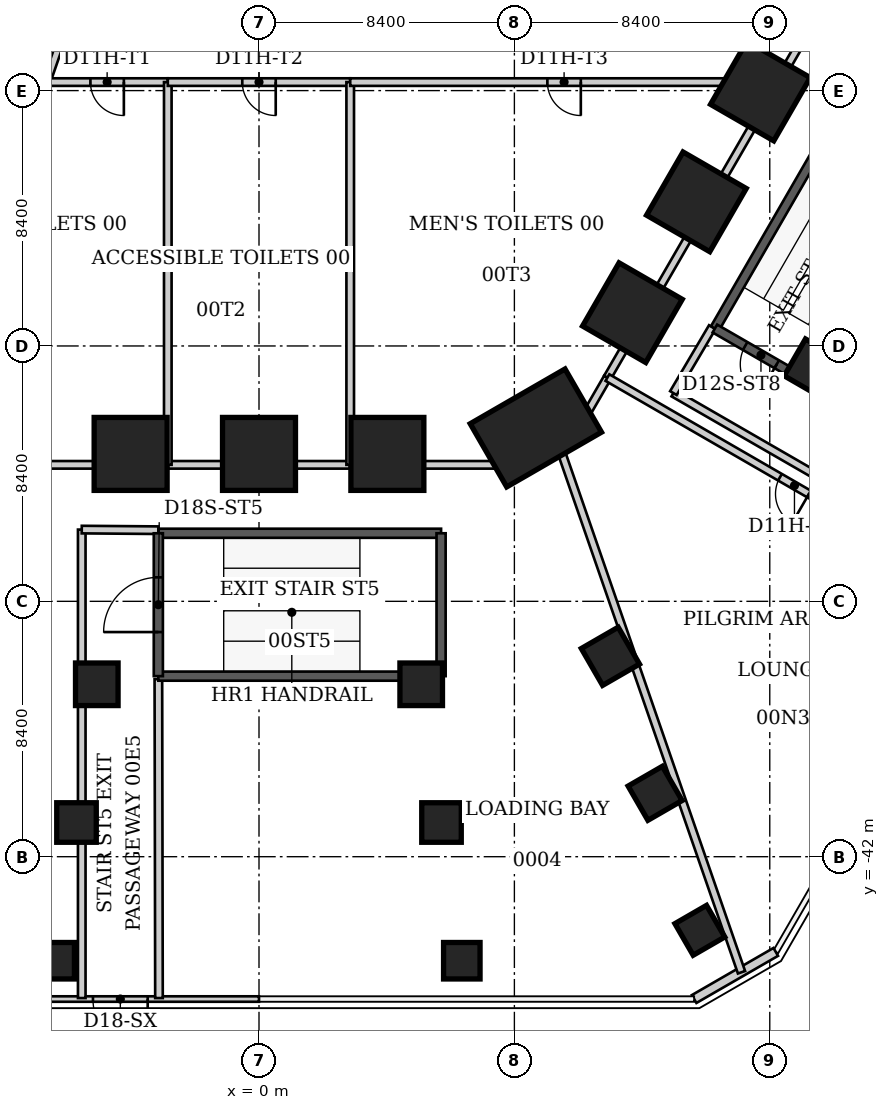
"""IFC4 building model, lengths in metres.
Left out: names, types, materials, properties, quantities, classifications, styles, units other than length and angle.
Written with IfcOpenShell. Run it as: python <this file> out.ifc"""

import sys

from ifc_helpers import new_model, si_unit, direction, frame, frame_2d, origin, origin_2d, place, context, subcontext, project, spatial, rectangle, extrude, element, fill, save


model = new_model("IFC4")
c1 = context("Model", 3, precision=1e-05, world=origin(), true_north=direction((0.0, 1.0)))
c2 = subcontext(c1, "Body", "Model", "MODEL_VIEW")
j1 = project(units=[si_unit("LENGTHUNIT", "METRE"), si_unit("PLANEANGLEUNIT", "RADIAN")], contexts=[c1])
p1 = place(None, origin())
s1 = spatial("IfcSite", under=j1, at=p1, CompositionType="ELEMENT")
p2 = place(p1, origin())
s2 = spatial("IfcBuilding", under=s1, at=p2, CompositionType="ELEMENT")
p3 = place(p2, origin())
s3 = spatial("IfcBuildingStorey", under=s2, at=p3, CompositionType="ELEMENT", Elevation=0.0)
for number, where, z_axis, x_axis in (
    (1, (16.491, -16.813, -0.2), (0.0, 0.0, 1.0), (0.866, -0.5, 0.0)),
    (2, (14.387, -20.459, -0.2), (0.0, 0.0, 1.0), (0.866, -0.5, 0.0)),
    (3, (12.282, -24.105, -0.2), (0.0, 0.0, 1.0), (0.866, -0.5, 0.0)),
):
    element("IfcColumn", number, at=place(p3, frame(where, z_axis=z_axis, x_axis=x_axis)), inside=s3, PredefinedType="COLUMN", context=c2, shape_type="SweptSolid", body=[
        extrude(rectangle(XDim=2.4, YDim=2.4, at=origin_2d()), origin(), (0.0, 0.0, 1.0), 6.2),
    ])
p4 = place(p3, frame((9.106, -27.897, -0.2), z_axis=(0.0, 0.0, 1.0), x_axis=(0.5, -0.866025403784, 0.0)))
e4 = element("IfcColumn", 4, at=p4, inside=s3, PredefinedType="COLUMN", context=c2, shape_type="SweptSolid", body=[
    extrude(rectangle(XDim=2.4, YDim=3.6, at=origin_2d()), origin(), (0.0, 0.0, 1.0), 6.2),
])
for number, where, z_axis, x_axis in (
    (5, (4.222, -28.751, -0.2), (0.0, 0.0, 1.0), (0.0, -1.0, 0.0)),
    (6, (0.0, -28.751, -0.2), (0.0, 0.0, 1.0), (0.0, -1.0, 0.0)),
    (7, (-4.222, -28.751, -0.2), (0.0, 0.0, 1.0), (0.0, -1.0, 0.0)),
):
    element("IfcColumn", number, at=place(p3, frame(where, z_axis=z_axis, x_axis=x_axis)), inside=s3, PredefinedType="COLUMN", context=c2, shape_type="SweptSolid", body=[
        extrude(rectangle(XDim=2.4, YDim=2.4, at=origin_2d()), origin(), (0.0, 0.0, 1.0), 6.2),
    ])
for number, where, z_axis, x_axis in (
    (8, (18.23, -25.926, -0.2), (0.0, 0.0, 1.0), (0.866, -0.5, 0.0)),
    (9, (11.558, -35.408, -0.2), (0.0, 0.0, 1.0), (0.5, -0.866, 0.0)),
    (10, (5.335, -36.329, -0.2), (0.0, 0.0, 1.0), (0.0, -1.0, 0.0)),
    (11, (-5.335, -36.329, -0.2), (0.0, 0.0, 1.0), (0.0, -1.0, 0.0)),
):
    element("IfcColumn", number, at=place(p3, frame(where, z_axis=z_axis, x_axis=x_axis)), inside=s3, PredefinedType="COLUMN", context=c2, shape_type="SweptSolid", body=[
        extrude(rectangle(XDim=1.4, YDim=1.4, at=origin_2d()), origin(), (0.0, 0.0, 1.0), 6.2),
    ])
for number, where, z_axis, x_axis in (
    (12, (13.029, -39.915, -0.2), (0.0, 0.0, 1.0), (0.5, -0.866, 0.0)),
    (13, (6.003, -40.875, -0.2), (0.0, 0.0, 1.0), (0.0, -1.0, 0.0)),
    (14, (-6.003, -40.875, -0.2), (0.0, 0.0, 1.0), (0.0, -1.0, 0.0)),
):
    element("IfcColumn", number, at=place(p3, frame(where, z_axis=z_axis, x_axis=x_axis)), inside=s3, PredefinedType="COLUMN", context=c2, shape_type="SweptSolid", body=[
        extrude(rectangle(XDim=1.3, YDim=1.3, at=origin_2d()), origin(), (0.0, 0.0, 1.0), 6.2),
    ])
for number, where, z_axis, x_axis in (
    (15, (14.5, -44.421, -0.2), (0.0, 0.0, 1.0), (0.5, -0.866, 0.0)),
    (16, (6.671, -45.422, -0.2), (0.0, 0.0, 1.0), (0.0, -1.0, 0.0)),
    (17, (-6.671, -45.422, -0.2), (0.0, 0.0, 1.0), (0.0, -1.0, 0.0)),
):
    element("IfcColumn", number, at=place(p3, frame(where, z_axis=z_axis, x_axis=x_axis)), inside=s3, PredefinedType="COLUMN", context=c2, shape_type="SweptSolid", body=[
        extrude(rectangle(XDim=1.2, YDim=1.2, at=origin_2d()), origin(), (0.0, 0.0, 1.0), 6.2),
    ])
p5 = place(p3, frame((16.997, -45.132, 0.0), z_axis=(0.0, 0.0, 1.0), x_axis=(-0.86600983753, -0.500026960575, 0.0)))
e18 = element("IfcWall", 18, at=p5, inside=s3, PredefinedType="SOLIDWALL", context=c2, shape_type="SweptSolid", body=[
    extrude(rectangle(XDim=3.1, YDim=0.3, at=frame_2d((1.55, 0.0))), origin(), (0.0, 0.0, 1.0), 5.84),
])
p6 = place(p3, frame((0.0, -46.682, 0.0), z_axis=(0.0, 0.0, 1.0), x_axis=(-1.0, 0.0, 0.0)))
e19 = element("IfcWall", 19, at=p6, inside=s3, PredefinedType="SOLIDWALL", context=c2, shape_type="SweptSolid", body=[
    extrude(rectangle(XDim=7.156, YDim=0.18, at=frame_2d((3.578, 0.0))), origin(), (0.0, 0.0, 1.0), 5.84),
])
p7 = place(p6, frame((3.661, 0.0, 0.0)))
e20 = element("IfcOpeningElement", 20, at=p7, cuts=e19, PredefinedType="OPENING", context=c2, shape_type="SweptSolid", body=[
    extrude(rectangle(XDim=1.8, YDim=2.7, at=frame_2d((0.9, 1.35))), frame((0.0, 0.09, 0.0), z_axis=(0.0, -1.0, 0.0), x_axis=(1.0, 0.0, 0.0)), (0.0, 0.0, 1.0), 0.18),
])
p8 = place(p3, frame((-8.65, -29.11, 0.0), z_axis=(0.0, 0.0, 1.0), x_axis=(1.0, 0.0, 0.0)))
e21 = element("IfcWall", 21, at=p8, inside=s3, PredefinedType="PARTITIONING", context=c2, shape_type="SweptSolid", body=[
    extrude(rectangle(XDim=5.65, YDim=0.25, at=frame_2d((2.825, 0.0))), origin(), (0.0, 0.0, 1.0), 4.04),
])
p9 = place(p3, frame((-5.83, -31.24, 0.0), z_axis=(0.0, 0.0, 1.0), x_axis=(0.0, -1.0, 0.0)))
e22 = element("IfcWall", 22, at=p9, inside=s3, PredefinedType="PARTITIONING", context=c2, shape_type="SweptSolid", body=[
    extrude(rectangle(XDim=15.41, YDim=0.25, at=frame_2d((7.705, 0.0))), origin(), (0.0, 0.0, 1.0), 5.083),
])
p10 = place(p3, frame((-5.81, -13.12, 0.0), z_axis=(0.0, 0.0, 1.0), x_axis=(-0.327865380048, -0.944724453249, 0.0)))
e23 = element("IfcWall", 23, at=p10, inside=s3, PredefinedType="PARTITIONING", context=c2, shape_type="SweptSolid", body=[
    extrude(rectangle(XDim=3.599, YDim=0.25, at=frame_2d((1.799, 0.0))), origin(), (0.0, 0.0, 1.0), 5.84),
])
p11 = place(p3, frame((-3.31, -31.26, 0.0), z_axis=(0.0, 0.0, 1.0), x_axis=(-0.999968446362, 0.007943946193, 0.0)))
e24 = element("IfcWall", 24, at=p11, inside=s3, PredefinedType="PARTITIONING", context=c2, shape_type="SweptSolid", body=[
    extrude(rectangle(XDim=2.52, YDim=0.25, at=frame_2d((1.26, 0.0))), origin(), (0.0, 0.0, 1.0), 5.84),
])
p12 = place(p3, frame((-3.29, -46.65, 0.0), z_axis=(0.0, 0.0, 1.0), x_axis=(-0.001908437887, 0.999998178931, 0.0)))
e25 = element("IfcWall", 25, at=p12, inside=s3, PredefinedType="PARTITIONING", context=c2, shape_type="SweptSolid", body=[
    extrude(rectangle(XDim=10.49, YDim=0.25, at=frame_2d((5.245, 0.0))), origin(), (0.0, 0.0, 1.0), 5.75),
])
p13 = place(p3, frame((-3.0, -29.11, 0.0), z_axis=(0.0, 0.0, 1.0), x_axis=(1.0, 0.0, 0.0)))
e26 = element("IfcWall", 26, at=p13, inside=s3, PredefinedType="PARTITIONING", context=c2, shape_type="SweptSolid", body=[
    extrude(rectangle(XDim=6.0, YDim=0.25, at=frame_2d((3.0, 0.0))), origin(), (0.0, 0.0, 1.0), 4.04),
])
p14 = place(p3, frame((-3.0, -16.52, 0.0), z_axis=(0.0, 0.0, 1.0), x_axis=(-1.0, 0.0, 0.0)))
e27 = element("IfcWall", 27, at=p14, inside=s3, PredefinedType="PARTITIONING", context=c2, shape_type="SweptSolid", body=[
    extrude(rectangle(XDim=3.99, YDim=0.25, at=frame_2d((1.995, 0.0))), origin(), (0.0, 0.0, 1.0), 5.84),
])
p15 = place(p14, frame((1.445, 0.0, 0.0)))
e28 = element("IfcOpeningElement", 28, at=p15, cuts=e27, PredefinedType="OPENING", context=c2, shape_type="SweptSolid", body=[
    extrude(rectangle(XDim=1.1, YDim=2.2, at=frame_2d((0.55, 1.1))), frame((0.0, 0.125, 0.0), z_axis=(0.0, -1.0, 0.0), x_axis=(1.0, 0.0, 0.0)), (0.0, 0.0, 1.0), 0.25),
])
p16 = place(p3, frame((-3.0, -16.52, 0.0), z_axis=(0.0, 0.0, 1.0), x_axis=(0.0, -1.0, 0.0)))
e29 = element("IfcWall", 29, at=p16, inside=s3, PredefinedType="PARTITIONING", context=c2, shape_type="SweptSolid", body=[
    extrude(rectangle(XDim=12.59, YDim=0.25, at=frame_2d((6.295, 0.0))), origin(), (0.0, 0.0, 1.0), 5.84),
])
p17 = place(p3, frame((3.0, -29.11, 0.0), z_axis=(0.0, 0.0, 1.0), x_axis=(1.0, 0.0, 0.0)))
e30 = element("IfcWall", 30, at=p17, inside=s3, PredefinedType="PARTITIONING", context=c2, shape_type="SweptSolid", body=[
    extrude(rectangle(XDim=5.65, YDim=0.25, at=frame_2d((2.825, 0.0))), origin(), (0.0, 0.0, 1.0), 4.04),
])
p18 = place(p3, frame((3.0, -16.52, 0.0), z_axis=(0.0, 0.0, 1.0), x_axis=(-1.0, 0.0, 0.0)))
e31 = element("IfcWall", 31, at=p18, inside=s3, PredefinedType="PARTITIONING", context=c2, shape_type="SweptSolid", body=[
    extrude(rectangle(XDim=6.0, YDim=0.25, at=frame_2d((3.0, 0.0))), origin(), (0.0, 0.0, 1.0), 5.84),
])
p19 = place(p18, frame((2.45, 0.0, 0.0)))
e32 = element("IfcOpeningElement", 32, at=p19, cuts=e31, PredefinedType="OPENING", context=c2, shape_type="SweptSolid", body=[
    extrude(rectangle(XDim=1.1, YDim=2.2, at=frame_2d((0.55, 1.1))), frame((0.0, 0.125, 0.0), z_axis=(0.0, -1.0, 0.0), x_axis=(1.0, 0.0, 0.0)), (0.0, 0.0, 1.0), 0.25),
])
p20 = place(p3, frame((3.0, -16.52, 0.0), z_axis=(0.0, 0.0, 1.0), x_axis=(0.0, -1.0, 0.0)))
e33 = element("IfcWall", 33, at=p20, inside=s3, PredefinedType="PARTITIONING", context=c2, shape_type="SweptSolid", body=[
    extrude(rectangle(XDim=12.59, YDim=0.25, at=frame_2d((6.295, 0.0))), origin(), (0.0, 0.0, 1.0), 5.84),
])
p21 = place(p3, frame((8.65, -29.11, 0.0), z_axis=(0.0, 0.0, 1.0), x_axis=(0.865736025111, 0.500500883941, 0.0)))
e34 = element("IfcWall", 34, at=p21, inside=s3, PredefinedType="PARTITIONING", context=c2, shape_type="SweptSolid", body=[
    extrude(rectangle(XDim=1.384, YDim=0.25, at=frame_2d((0.692, 0.0))), origin(), (0.0, 0.0, 1.0), 5.84),
])
p22 = place(p3, frame((9.85, -28.42, 0.0), z_axis=(0.0, 0.0, 1.0), x_axis=(0.327267371913, -0.944931779168, 0.0)))
e35 = element("IfcWall", 35, at=p22, inside=s3, PredefinedType="PARTITIONING", context=c2, shape_type="SweptSolid", body=[
    extrude(rectangle(XDim=18.395, YDim=0.25, at=frame_2d((9.197, 0.0))), origin(), (0.0, 0.0, 1.0), 5.75),
])
p23 = place(p3, frame((10.38, -28.11, 0.0), z_axis=(0.0, 0.0, 1.0), x_axis=(-0.865714845822, -0.5005375168, 0.0)))
e36 = element("IfcWall", 36, at=p23, inside=s3, PredefinedType="PARTITIONING", context=c2, shape_type="SweptSolid", body=[
    extrude(rectangle(XDim=0.579, YDim=0.25, at=frame_2d((0.29, 0.0))), origin(), (0.0, 0.0, 1.0), 5.84),
])
p24 = place(p3, frame((10.38, -28.11, 0.0), z_axis=(0.0, 0.0, 1.0), x_axis=(0.500126914667, 0.865952117167, 0.0)))
e37 = element("IfcWall", 37, at=p24, inside=s3, PredefinedType="PARTITIONING", context=c2, shape_type="SweptSolid", body=[
    extrude(rectangle(XDim=2.16, YDim=0.25, at=frame_2d((1.08, 0.0))), origin(), (0.0, 0.0, 1.0), 5.84),
])
p25 = place(p3, frame((11.46, -26.24, 0.0), z_axis=(0.0, 0.0, 1.0), x_axis=(0.500553622729, 0.865705533523, 0.0)))
e38 = element("IfcWall", 38, at=p25, inside=s3, PredefinedType="PARTITIONING", context=c2, shape_type="SweptSolid", body=[
    extrude(rectangle(XDim=11.228, YDim=0.25, at=frame_2d((5.614, 0.0))), origin(), (0.0, 0.0, 1.0), 4.04),
])
p26 = place(p3, frame((13.63, -26.75, 0.0), z_axis=(0.0, 0.0, 1.0), x_axis=(0.866259937365, -0.49959355572, 0.0)))
e39 = element("IfcWall", 39, at=p26, inside=s3, PredefinedType="PARTITIONING", context=c2, shape_type="SweptSolid", body=[
    extrude(rectangle(XDim=12.08, YDim=0.25, at=frame_2d((6.04, 0.0))), origin(), (0.0, 0.0, 1.0), 5.75),
])
p27 = place(p3, frame((14.91, -24.58, 0.0), z_axis=(0.0, 0.0, 1.0), x_axis=(-0.508082727165, -0.861308273707, 0.0)))
e40 = element("IfcWall", 40, at=p27, inside=s3, PredefinedType="PARTITIONING", context=c2, shape_type="SweptSolid", body=[
    extrude(rectangle(XDim=2.519, YDim=0.25, at=frame_2d((1.26, 0.0))), origin(), (0.0, 0.0, 1.0), 5.84),
])
p28 = place(p3, frame((17.07, -16.52, 0.0), z_axis=(0.0, 0.0, 1.0), x_axis=(-1.0, 0.0, 0.0)))
e41 = element("IfcWall", 41, at=p28, inside=s3, PredefinedType="PARTITIONING", context=c2, shape_type="SweptSolid", body=[
    extrude(rectangle(XDim=14.07, YDim=0.25, at=frame_2d((7.035, 0.0))), origin(), (0.0, 0.0, 1.0), 5.84),
])
p29 = place(p28, frame((6.485, 0.0, 0.0)))
e42 = element("IfcOpeningElement", 42, at=p29, cuts=e41, PredefinedType="OPENING", context=c2, shape_type="SweptSolid", body=[
    extrude(rectangle(XDim=1.1, YDim=2.2, at=frame_2d((0.55, 1.1))), frame((0.0, 0.125, 0.0), z_axis=(0.0, -1.0, 0.0), x_axis=(1.0, 0.0, 0.0)), (0.0, 0.0, 1.0), 0.25),
])
p30 = place(p3, frame((17.07, -16.52, 0.0), z_axis=(0.0, 0.0, 1.0), x_axis=(0.500243727505, 0.865884641908, 0.0)))
e43 = element("IfcWall", 43, at=p30, inside=s3, PredefinedType="PARTITIONING", context=c2, shape_type="SweptSolid", body=[
    extrude(rectangle(XDim=15.972, YDim=0.25, at=frame_2d((7.986, 0.0))), origin(), (0.0, 0.0, 1.0), 4.04),
])
p31 = place(p3, frame((23.764, -33.345, 0.0), z_axis=(0.0, 0.0, 1.0), x_axis=(-0.865986126124, 0.500068024733, 0.0)))
e44 = element("IfcWall", 44, at=p31, inside=s3, PredefinedType="PARTITIONING", context=c2, shape_type="SweptSolid", body=[
    extrude(rectangle(XDim=14.208, YDim=0.25, at=frame_2d((7.104, 0.0))), origin(), (0.0, 0.0, 1.0), 5.75),
])
p32 = place(p31, frame((6.554, 0.0, 0.0)))
e45 = element("IfcOpeningElement", 45, at=p32, cuts=e44, PredefinedType="OPENING", context=c2, shape_type="SweptSolid", body=[
    extrude(rectangle(XDim=1.1, YDim=2.2, at=frame_2d((0.55, 1.1))), frame((0.0, 0.125, 0.0), z_axis=(0.0, -1.0, 0.0), x_axis=(1.0, 0.0, 0.0)), (0.0, 0.0, 1.0), 0.25),
])
p33 = place(p3, frame((-3.311, -31.361, 0.0), z_axis=(0.0, 0.0, 1.0), x_axis=(1.0, 0.0, 0.0)))
e46 = element("IfcWall", 46, at=p33, inside=s3, PredefinedType="SHEAR", context=c2, shape_type="SweptSolid", body=[
    extrude(rectangle(XDim=9.3, YDim=0.3, at=frame_2d((4.65, 0.0))), origin(), (0.0, 0.0, 1.0), 6.0),
])
p34 = place(p3, frame((5.989, -31.361, 0.0), z_axis=(0.0, 0.0, 1.0), x_axis=(0.0, -1.0, 0.0)))
e47 = element("IfcWall", 47, at=p34, inside=s3, PredefinedType="SHEAR", context=c2, shape_type="SweptSolid", body=[
    extrude(rectangle(XDim=4.7, YDim=0.3, at=frame_2d((2.35, 0.0))), origin(), (0.0, 0.0, 1.0), 6.0),
])
p35 = place(p3, frame((5.989, -36.061, 0.0), z_axis=(0.0, 0.0, 1.0), x_axis=(-1.0, 0.0, 0.0)))
e48 = element("IfcWall", 48, at=p35, inside=s3, PredefinedType="SHEAR", context=c2, shape_type="SweptSolid", body=[
    extrude(rectangle(XDim=9.3, YDim=0.3, at=frame_2d((4.65, 0.0))), origin(), (0.0, 0.0, 1.0), 6.0),
])
p36 = place(p3, frame((-3.311, -36.061, 0.0), z_axis=(0.0, 0.0, 1.0), x_axis=(0.0, 1.0, 0.0)))
e49 = element("IfcWall", 49, at=p36, inside=s3, PredefinedType="SHEAR", context=c2, shape_type="SweptSolid", body=[
    extrude(rectangle(XDim=4.7, YDim=0.3, at=frame_2d((2.35, 0.0))), origin(), (0.0, 0.0, 1.0), 6.0),
])
p37 = place(p36, frame((1.45, 0.0, 0.0)))
e50 = element("IfcOpeningElement", 50, at=p37, cuts=e49, PredefinedType="OPENING", context=c2, shape_type="SweptSolid", body=[
    extrude(rectangle(XDim=1.8, YDim=2.4, at=frame_2d((0.9, 1.2))), frame((0.0, 0.15, 0.0), z_axis=(0.0, -1.0, 0.0), x_axis=(1.0, 0.0, 0.0)), (0.0, 0.0, 1.0), 0.3),
])
p38 = place(p3, frame((14.994, -24.626, 0.0), z_axis=(0.0, 0.0, 1.0), x_axis=(0.500015592816, 0.866016401081, 0.0)))
e51 = element("IfcWall", 51, at=p38, inside=s3, PredefinedType="SHEAR", context=c2, shape_type="SweptSolid", body=[
    extrude(rectangle(XDim=9.3, YDim=0.3, at=frame_2d((4.65, 0.0))), origin(), (0.0, 0.0, 1.0), 6.0),
])
p39 = place(p3, frame((22.676, -18.322, 0.0), z_axis=(0.0, 0.0, 1.0), x_axis=(-0.499995904083, -0.86602776855, 0.0)))
e52 = element("IfcWall", 52, at=p39, inside=s3, PredefinedType="SHEAR", context=c2, shape_type="SweptSolid", body=[
    extrude(rectangle(XDim=9.3, YDim=0.3, at=frame_2d((4.65, 0.0))), origin(), (0.0, 0.0, 1.0), 6.0),
])
p40 = place(p3, frame((18.026, -26.376, 0.0), z_axis=(0.0, 0.0, 1.0), x_axis=(-0.866036909293, 0.499980071345, 0.0)))
e53 = element("IfcWall", 53, at=p40, inside=s3, PredefinedType="SHEAR", context=c2, shape_type="SweptSolid", body=[
    extrude(rectangle(XDim=3.5, YDim=0.3, at=frame_2d((1.75, 0.0))), origin(), (0.0, 0.0, 1.0), 6.0),
])
p41 = place(p40, frame((1.15, 0.0, 0.0)))
e54 = element("IfcOpeningElement", 54, at=p41, cuts=e53, PredefinedType="OPENING", context=c2, shape_type="SweptSolid", body=[
    extrude(rectangle(XDim=1.2, YDim=2.4, at=frame_2d((0.6, 1.2))), frame((0.0, 0.15, 0.0), z_axis=(0.0, -1.0, 0.0), x_axis=(1.0, 0.0, 0.0)), (0.0, 0.0, 1.0), 0.3),
])
p42 = place(p7, origin())
e55 = element("IfcDoor", 55, at=p42, inside=s3, OperationType="SINGLE_SWING_LEFT", PredefinedType="DOOR", context=c2, shape_type="SweptSolid", body=[
    extrude(rectangle(XDim=1.8, YDim=2.7, at=frame_2d((0.9, 1.35))), frame((0.0, 0.025, 0.0), z_axis=(0.0, -1.0, 0.0), x_axis=(1.0, 0.0, 0.0)), (0.0, 0.0, 1.0), 0.05),
])
fill(e20, e55)
p43 = place(p32, origin())
e56 = element("IfcDoor", 56, at=p43, inside=s3, OperationType="SINGLE_SWING_LEFT", PredefinedType="DOOR", context=c2, shape_type="SweptSolid", body=[
    extrude(rectangle(XDim=1.1, YDim=2.2, at=frame_2d((0.55, 1.1))), frame((0.0, 0.025, 0.0), z_axis=(0.0, -1.0, 0.0), x_axis=(1.0, 0.0, 0.0)), (0.0, 0.0, 1.0), 0.05),
])
fill(e45, e56)
p44 = place(p15, origin())
e57 = element("IfcDoor", 57, at=p44, inside=s3, OperationType="SINGLE_SWING_LEFT", PredefinedType="DOOR", context=c2, shape_type="SweptSolid", body=[
    extrude(rectangle(XDim=1.1, YDim=2.2, at=frame_2d((0.55, 1.1))), frame((0.0, 0.025, 0.0), z_axis=(0.0, -1.0, 0.0), x_axis=(1.0, 0.0, 0.0)), (0.0, 0.0, 1.0), 0.05),
])
fill(e28, e57)
p45 = place(p19, origin())
e58 = element("IfcDoor", 58, at=p45, inside=s3, OperationType="SINGLE_SWING_LEFT", PredefinedType="DOOR", context=c2, shape_type="SweptSolid", body=[
    extrude(rectangle(XDim=1.1, YDim=2.2, at=frame_2d((0.55, 1.1))), frame((0.0, 0.025, 0.0), z_axis=(0.0, -1.0, 0.0), x_axis=(1.0, 0.0, 0.0)), (0.0, 0.0, 1.0), 0.05),
])
fill(e32, e58)
p46 = place(p29, origin())
e59 = element("IfcDoor", 59, at=p46, inside=s3, OperationType="SINGLE_SWING_LEFT", PredefinedType="DOOR", context=c2, shape_type="SweptSolid", body=[
    extrude(rectangle(XDim=1.1, YDim=2.2, at=frame_2d((0.55, 1.1))), frame((0.0, 0.025, 0.0), z_axis=(0.0, -1.0, 0.0), x_axis=(1.0, 0.0, 0.0)), (0.0, 0.0, 1.0), 0.05),
])
fill(e42, e59)
p47 = place(p37, origin())
e60 = element("IfcDoor", 60, at=p47, inside=s3, OperationType="DOUBLE_DOOR_SINGLE_SWING", PredefinedType="DOOR", context=c2, shape_type="SweptSolid", body=[
    extrude(rectangle(XDim=1.8, YDim=2.4, at=frame_2d((0.9, 1.2))), frame((0.0, 0.025, 0.0), z_axis=(0.0, -1.0, 0.0), x_axis=(1.0, 0.0, 0.0)), (0.0, 0.0, 1.0), 0.05),
])
fill(e50, e60)
p48 = place(p41, origin())
e61 = element("IfcDoor", 61, at=p48, inside=s3, OperationType="SINGLE_SWING_LEFT", PredefinedType="DOOR", context=c2, shape_type="SweptSolid", body=[
    extrude(rectangle(XDim=1.2, YDim=2.4, at=frame_2d((0.6, 1.2))), frame((0.0, 0.025, 0.0), z_axis=(0.0, -1.0, 0.0), x_axis=(1.0, 0.0, 0.0)), (0.0, 0.0, 1.0), 0.05),
])
fill(e54, e61)
save(model, sys.argv[1])
